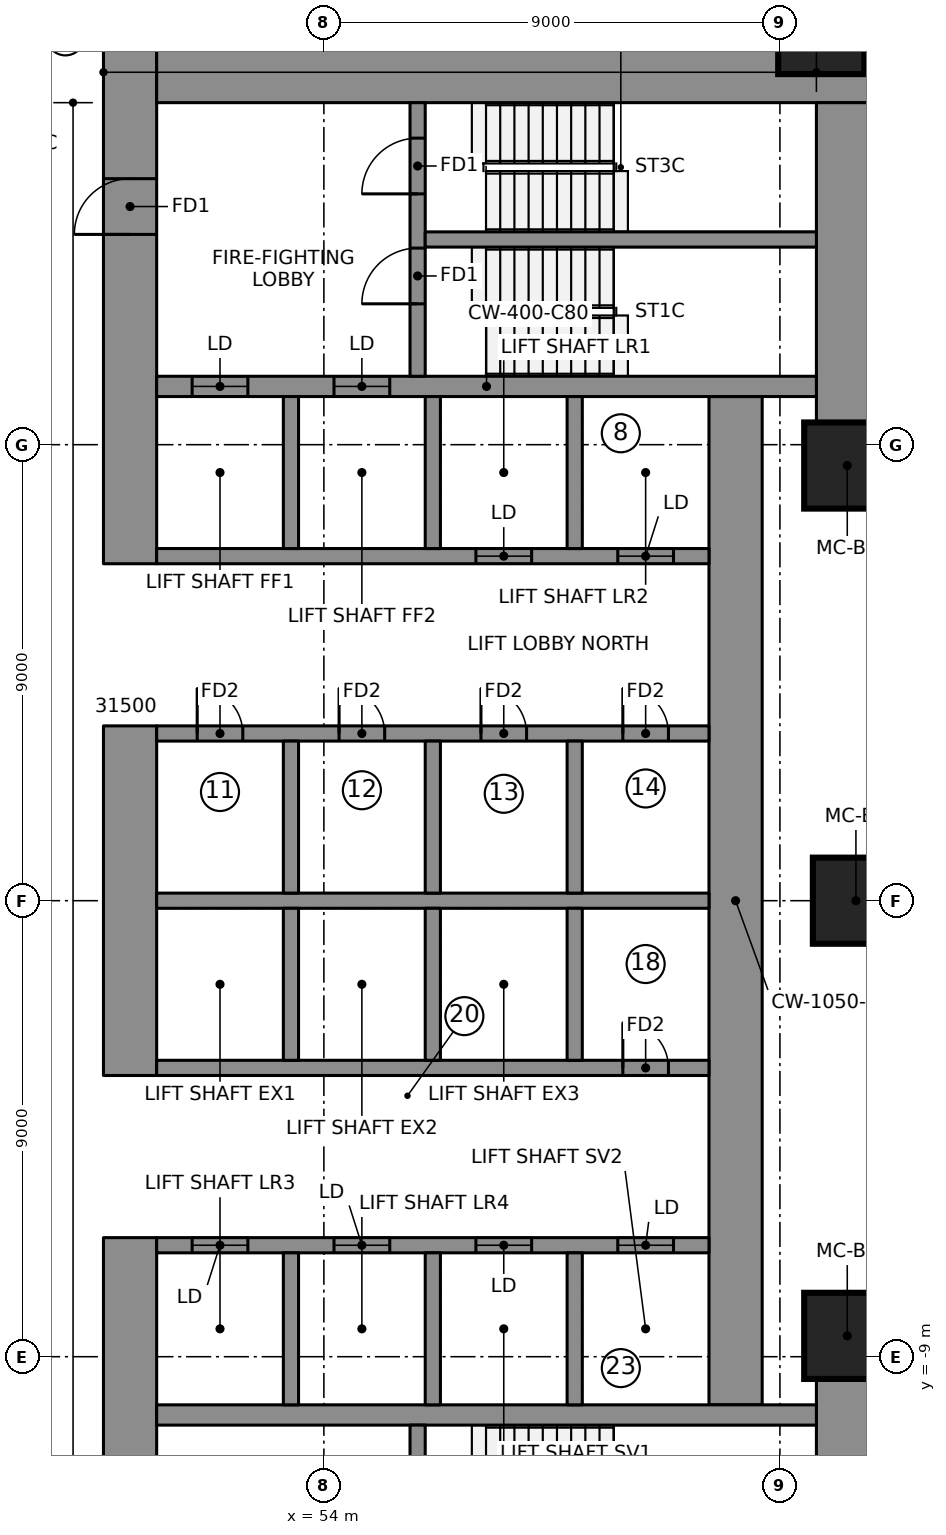
"""IFC4 building model, lengths in metres.
Left out: names, types, materials, properties, quantities, classifications, styles, units other than length and angle.
Written with IfcOpenShell. Run it as: python <this file> out.ifc"""

import sys

from ifc_helpers import new_model, si_unit, direction, frame, frame_2d, origin, origin_2d, place, context, subcontext, project, spatial, rectangle, extrude, element, fill, save


model = new_model("IFC4")
c1 = context("Model", 3, precision=1e-05, world=origin(), true_north=direction((0.0, 1.0)))
c2 = subcontext(c1, "Body", "Model", "MODEL_VIEW")
j1 = project(units=[si_unit("LENGTHUNIT", "METRE"), si_unit("PLANEANGLEUNIT", "RADIAN")], contexts=[c1])
p1 = place(None, origin())
s1 = spatial("IfcSite", under=j1, at=p1, CompositionType="ELEMENT")
p2 = place(p1, origin())
s2 = spatial("IfcBuilding", under=s1, at=p2, CompositionType="ELEMENT")
p3 = place(p2, frame((0.0, 0.0, 92.0)))
s3 = spatial("IfcBuildingStorey", under=s2, at=p3, CompositionType="ELEMENT", Elevation=92.0)
p4 = place(p3, frame((50.175, 6.65, 0.0), z_axis=(0.0, 0.0, 1.0), x_axis=(0.0, 1.0, 0.0)))
e1 = element("IfcWall", 1, at=p4, inside=s3, PredefinedType="SHEAR", context=c2, shape_type="SweptSolid", body=[
    extrude(rectangle(XDim=10.15, YDim=1.05, at=frame_2d((5.075, 0.0))), origin(), (0.0, 0.0, 1.0), 3.55),
])
p5 = place(p4, frame((6.5, 0.0, 0.0)))
e2 = element("IfcOpeningElement", 2, at=p5, cuts=e1, PredefinedType="OPENING", context=c2, shape_type="SweptSolid", body=[
    extrude(rectangle(XDim=1.1, YDim=2.1, at=frame_2d((0.55, 1.05))), frame((0.0, 0.535, 0.0), z_axis=(0.0, -1.0, 0.0), x_axis=(1.0, 0.0, 0.0)), (0.0, 0.0, 1.0), 1.07),
])
p6 = place(p3, frame((50.175, -3.45, 0.0), z_axis=(0.0, 0.0, 1.0), x_axis=(0.0, 1.0, 0.0)))
e3 = element("IfcWall", 3, at=p6, inside=s3, PredefinedType="SHEAR", context=c2, shape_type="SweptSolid", body=[
    extrude(rectangle(XDim=6.9, YDim=1.05, at=frame_2d((3.45, 0.0))), origin(), (0.0, 0.0, 1.0), 3.55),
])
p7 = place(p3, frame((50.175, -16.8, 0.0), z_axis=(0.0, 0.0, 1.0), x_axis=(0.0, 1.0, 0.0)))
e4 = element("IfcWall", 4, at=p7, inside=s3, PredefinedType="SHEAR", context=c2, shape_type="SweptSolid", body=[
    extrude(rectangle(XDim=10.15, YDim=1.05, at=frame_2d((5.075, 0.0))), origin(), (0.0, 0.0, 1.0), 3.55),
])
p8 = place(p7, frame((2.55, 0.0, 0.0)))
e5 = element("IfcOpeningElement", 5, at=p8, cuts=e4, PredefinedType="OPENING", context=c2, shape_type="SweptSolid", body=[
    extrude(rectangle(XDim=1.1, YDim=2.1, at=frame_2d((0.55, 1.05))), frame((0.0, 0.535, 0.0), z_axis=(0.0, -1.0, 0.0), x_axis=(1.0, 0.0, 0.0)), (0.0, 0.0, 1.0), 1.07),
])
p9 = place(p3, frame((50.7, 16.275, 0.0), z_axis=(0.0, 0.0, 1.0), x_axis=(1.0, 0.0, 0.0)))
e6 = element("IfcWall", 6, at=p9, inside=s3, PredefinedType="SHEAR", context=c2, shape_type="SweptSolid", body=[
    extrude(rectangle(XDim=14.07, YDim=1.05, at=frame_2d((7.035, 0.0))), origin(), (0.0, 0.0, 1.0), 3.55),
])
for number, where, z_axis, x_axis in (
    (7, (64.245, 9.389, 0.0), (0.0, 0.0, 1.0), (0.0, 1.0, 0.0)),
    (8, (64.245, -15.75, 0.0), (0.0, 0.0, 1.0), (0.0, 1.0, 0.0)),
):
    element("IfcWall", number, at=place(p3, frame(where, z_axis=z_axis, x_axis=x_axis)), inside=s3, PredefinedType="SHEAR", context=c2, shape_type="SweptSolid", body=[
        extrude(rectangle(XDim=6.361, YDim=1.05, at=frame_2d((3.181, 0.0))), origin(), (0.0, 0.0, 1.0), 3.55),
    ])
p10 = place(p3, frame((62.125, -9.95, 0.0), z_axis=(0.0, 0.0, 1.0), x_axis=(0.0, 1.0, 0.0)))
e9 = element("IfcWall", 9, at=p10, inside=s3, PredefinedType="SHEAR", context=c2, shape_type="SweptSolid", body=[
    extrude(rectangle(XDim=19.9, YDim=1.05, at=frame_2d((9.95, 0.0))), origin(), (0.0, 0.0, 1.0), 3.55),
])
p11 = place(p3, frame((50.7, 10.15, 0.0), z_axis=(0.0, 0.0, 1.0), x_axis=(1.0, 0.0, 0.0)))
e10 = element("IfcWall", 10, at=p11, inside=s3, PredefinedType="SHEAR", context=c2, shape_type="SweptSolid", body=[
    extrude(rectangle(XDim=13.02, YDim=0.4, at=frame_2d((6.51, 0.0))), origin(), (0.0, 0.0, 1.0), 3.55),
])
p12 = place(p11, frame((0.7, 0.0, 0.0)))
e11 = element("IfcOpeningElement", 11, at=p12, cuts=e10, PredefinedType="OPENING", context=c2, shape_type="SweptSolid", body=[
    extrude(rectangle(XDim=1.1, YDim=2.1, at=frame_2d((0.55, 1.05))), frame((0.0, 0.21, 0.0), z_axis=(0.0, -1.0, 0.0), x_axis=(1.0, 0.0, 0.0)), (0.0, 0.0, 1.0), 0.42),
])
p13 = place(p11, frame((3.5, 0.0, 0.0)))
e12 = element("IfcOpeningElement", 12, at=p13, cuts=e10, PredefinedType="OPENING", context=c2, shape_type="SweptSolid", body=[
    extrude(rectangle(XDim=1.1, YDim=2.1, at=frame_2d((0.55, 1.05))), frame((0.0, 0.21, 0.0), z_axis=(0.0, -1.0, 0.0), x_axis=(1.0, 0.0, 0.0)), (0.0, 0.0, 1.0), 0.42),
])
p14 = place(p3, frame((50.7, -10.15, 0.0), z_axis=(0.0, 0.0, 1.0), x_axis=(1.0, 0.0, 0.0)))
e13 = element("IfcWall", 13, at=p14, inside=s3, PredefinedType="SHEAR", context=c2, shape_type="SweptSolid", body=[
    extrude(rectangle(XDim=13.02, YDim=0.4, at=frame_2d((6.51, 0.0))), origin(), (0.0, 0.0, 1.0), 3.55),
])
p15 = place(p3, frame((50.7, 0.0, 0.0), z_axis=(0.0, 0.0, 1.0), x_axis=(1.0, 0.0, 0.0)))
e14 = element("IfcWall", 14, at=p15, inside=s3, PredefinedType="SHEAR", context=c2, shape_type="SweptSolid", body=[
    extrude(rectangle(XDim=10.9, YDim=0.3, at=frame_2d((5.45, 0.0))), origin(), (0.0, 0.0, 1.0), 3.55),
])
p16 = place(p3, frame((50.7, 3.3, 0.0), z_axis=(0.0, 0.0, 1.0), x_axis=(1.0, 0.0, 0.0)))
e15 = element("IfcWall", 15, at=p16, inside=s3, PredefinedType="SHEAR", context=c2, shape_type="SweptSolid", body=[
    extrude(rectangle(XDim=10.9, YDim=0.3, at=frame_2d((5.45, 0.0))), origin(), (0.0, 0.0, 1.0), 3.55),
])
p17 = place(p16, frame((0.8, 0.0, 0.0)))
e16 = element("IfcOpeningElement", 16, at=p17, cuts=e15, PredefinedType="OPENING", context=c2, shape_type="SweptSolid", body=[
    extrude(rectangle(XDim=0.9, YDim=2.1, at=frame_2d((0.45, 1.05))), frame((0.0, 0.16, 0.0), z_axis=(0.0, -1.0, 0.0), x_axis=(1.0, 0.0, 0.0)), (0.0, 0.0, 1.0), 0.32),
])
p18 = place(p16, frame((3.6, 0.0, 0.0)))
e17 = element("IfcOpeningElement", 17, at=p18, cuts=e15, PredefinedType="OPENING", context=c2, shape_type="SweptSolid", body=[
    extrude(rectangle(XDim=0.9, YDim=2.1, at=frame_2d((0.45, 1.05))), frame((0.0, 0.16, 0.0), z_axis=(0.0, -1.0, 0.0), x_axis=(1.0, 0.0, 0.0)), (0.0, 0.0, 1.0), 0.32),
])
p19 = place(p16, frame((6.4, 0.0, 0.0)))
e18 = element("IfcOpeningElement", 18, at=p19, cuts=e15, PredefinedType="OPENING", context=c2, shape_type="SweptSolid", body=[
    extrude(rectangle(XDim=0.9, YDim=2.1, at=frame_2d((0.45, 1.05))), frame((0.0, 0.16, 0.0), z_axis=(0.0, -1.0, 0.0), x_axis=(1.0, 0.0, 0.0)), (0.0, 0.0, 1.0), 0.32),
])
p20 = place(p16, frame((9.2, 0.0, 0.0)))
e19 = element("IfcOpeningElement", 19, at=p20, cuts=e15, PredefinedType="OPENING", context=c2, shape_type="SweptSolid", body=[
    extrude(rectangle(XDim=0.9, YDim=2.1, at=frame_2d((0.45, 1.05))), frame((0.0, 0.16, 0.0), z_axis=(0.0, -1.0, 0.0), x_axis=(1.0, 0.0, 0.0)), (0.0, 0.0, 1.0), 0.32),
])
p21 = place(p3, frame((50.7, 6.8, 0.0), z_axis=(0.0, 0.0, 1.0), x_axis=(1.0, 0.0, 0.0)))
e20 = element("IfcWall", 20, at=p21, inside=s3, PredefinedType="SHEAR", context=c2, shape_type="SweptSolid", body=[
    extrude(rectangle(XDim=10.9, YDim=0.3, at=frame_2d((5.45, 0.0))), origin(), (0.0, 0.0, 1.0), 3.55),
])
p22 = place(p21, frame((6.3, 0.0, 0.0)))
e21 = element("IfcOpeningElement", 21, at=p22, cuts=e20, PredefinedType="OPENING", context=c2, shape_type="SweptSolid", body=[
    extrude(rectangle(XDim=1.1, YDim=2.1, at=frame_2d((0.55, 1.05))), frame((0.0, 0.16, 0.0), z_axis=(0.0, -1.0, 0.0), x_axis=(1.0, 0.0, 0.0)), (0.0, 0.0, 1.0), 0.32),
])
p23 = place(p21, frame((9.1, 0.0, 0.0)))
e22 = element("IfcOpeningElement", 22, at=p23, cuts=e20, PredefinedType="OPENING", context=c2, shape_type="SweptSolid", body=[
    extrude(rectangle(XDim=1.1, YDim=2.1, at=frame_2d((0.55, 1.05))), frame((0.0, 0.16, 0.0), z_axis=(0.0, -1.0, 0.0), x_axis=(1.0, 0.0, 0.0)), (0.0, 0.0, 1.0), 0.32),
])
for number, where, z_axis, x_axis in (
    (23, (53.35, 0.15, 0.0), (0.0, 0.0, 1.0), (0.0, 1.0, 0.0)),
    (24, (53.35, 6.95, 0.0), (0.0, 0.0, 1.0), (0.0, 1.0, 0.0)),
    (25, (56.15, 0.15, 0.0), (0.0, 0.0, 1.0), (0.0, 1.0, 0.0)),
    (26, (56.15, 6.95, 0.0), (0.0, 0.0, 1.0), (0.0, 1.0, 0.0)),
    (27, (58.95, 0.15, 0.0), (0.0, 0.0, 1.0), (0.0, 1.0, 0.0)),
    (28, (58.95, 6.95, 0.0), (0.0, 0.0, 1.0), (0.0, 1.0, 0.0)),
):
    element("IfcWall", number, at=place(p3, frame(where, z_axis=z_axis, x_axis=x_axis)), inside=s3, PredefinedType="SHEAR", context=c2, shape_type="SweptSolid", body=[
        extrude(rectangle(XDim=3.0, YDim=0.3, at=frame_2d((1.5, 0.0))), origin(), (0.0, 0.0, 1.0), 3.55),
    ])
p24 = place(p3, frame((50.7, -3.3, 0.0), z_axis=(0.0, 0.0, 1.0), x_axis=(1.0, 0.0, 0.0)))
e29 = element("IfcWall", 29, at=p24, inside=s3, PredefinedType="SHEAR", context=c2, shape_type="SweptSolid", body=[
    extrude(rectangle(XDim=10.9, YDim=0.3, at=frame_2d((5.45, 0.0))), origin(), (0.0, 0.0, 1.0), 3.55),
])
p25 = place(p24, frame((9.2, 0.0, 0.0)))
e30 = element("IfcOpeningElement", 30, at=p25, cuts=e29, PredefinedType="OPENING", context=c2, shape_type="SweptSolid", body=[
    extrude(rectangle(XDim=0.9, YDim=2.1, at=frame_2d((0.45, 1.05))), frame((0.0, 0.16, 0.0), z_axis=(0.0, -1.0, 0.0), x_axis=(1.0, 0.0, 0.0)), (0.0, 0.0, 1.0), 0.32),
])
p26 = place(p3, frame((50.7, -6.8, 0.0), z_axis=(0.0, 0.0, 1.0), x_axis=(1.0, 0.0, 0.0)))
e31 = element("IfcWall", 31, at=p26, inside=s3, PredefinedType="SHEAR", context=c2, shape_type="SweptSolid", body=[
    extrude(rectangle(XDim=10.9, YDim=0.3, at=frame_2d((5.45, 0.0))), origin(), (0.0, 0.0, 1.0), 3.55),
])
p27 = place(p26, frame((0.7, 0.0, 0.0)))
e32 = element("IfcOpeningElement", 32, at=p27, cuts=e31, PredefinedType="OPENING", context=c2, shape_type="SweptSolid", body=[
    extrude(rectangle(XDim=1.1, YDim=2.1, at=frame_2d((0.55, 1.05))), frame((0.0, 0.16, 0.0), z_axis=(0.0, -1.0, 0.0), x_axis=(1.0, 0.0, 0.0)), (0.0, 0.0, 1.0), 0.32),
])
p28 = place(p26, frame((3.5, 0.0, 0.0)))
e33 = element("IfcOpeningElement", 33, at=p28, cuts=e31, PredefinedType="OPENING", context=c2, shape_type="SweptSolid", body=[
    extrude(rectangle(XDim=1.1, YDim=2.1, at=frame_2d((0.55, 1.05))), frame((0.0, 0.16, 0.0), z_axis=(0.0, -1.0, 0.0), x_axis=(1.0, 0.0, 0.0)), (0.0, 0.0, 1.0), 0.32),
])
p29 = place(p26, frame((6.3, 0.0, 0.0)))
e34 = element("IfcOpeningElement", 34, at=p29, cuts=e31, PredefinedType="OPENING", context=c2, shape_type="SweptSolid", body=[
    extrude(rectangle(XDim=1.1, YDim=2.1, at=frame_2d((0.55, 1.05))), frame((0.0, 0.16, 0.0), z_axis=(0.0, -1.0, 0.0), x_axis=(1.0, 0.0, 0.0)), (0.0, 0.0, 1.0), 0.32),
])
p30 = place(p26, frame((9.1, 0.0, 0.0)))
e35 = element("IfcOpeningElement", 35, at=p30, cuts=e31, PredefinedType="OPENING", context=c2, shape_type="SweptSolid", body=[
    extrude(rectangle(XDim=1.1, YDim=2.1, at=frame_2d((0.55, 1.05))), frame((0.0, 0.16, 0.0), z_axis=(0.0, -1.0, 0.0), x_axis=(1.0, 0.0, 0.0)), (0.0, 0.0, 1.0), 0.32),
])
for number, where, z_axis, x_axis in (
    (36, (53.35, -3.15, 0.0), (0.0, 0.0, 1.0), (0.0, 1.0, 0.0)),
    (37, (53.35, -9.95, 0.0), (0.0, 0.0, 1.0), (0.0, 1.0, 0.0)),
    (38, (56.15, -3.15, 0.0), (0.0, 0.0, 1.0), (0.0, 1.0, 0.0)),
    (39, (56.15, -9.95, 0.0), (0.0, 0.0, 1.0), (0.0, 1.0, 0.0)),
    (40, (58.95, -3.15, 0.0), (0.0, 0.0, 1.0), (0.0, 1.0, 0.0)),
    (41, (58.95, -9.95, 0.0), (0.0, 0.0, 1.0), (0.0, 1.0, 0.0)),
):
    element("IfcWall", number, at=place(p3, frame(where, z_axis=z_axis, x_axis=x_axis)), inside=s3, PredefinedType="SHEAR", context=c2, shape_type="SweptSolid", body=[
        extrude(rectangle(XDim=3.0, YDim=0.3, at=frame_2d((1.5, 0.0))), origin(), (0.0, 0.0, 1.0), 3.55),
    ])
p31 = place(p3, frame((55.85, 10.35, 0.0), z_axis=(0.0, 0.0, 1.0), x_axis=(0.0, 1.0, 0.0)))
e42 = element("IfcWall", 42, at=p31, inside=s3, PredefinedType="SHEAR", context=c2, shape_type="SweptSolid", body=[
    extrude(rectangle(XDim=5.4, YDim=0.3, at=frame_2d((2.7, 0.0))), origin(), (0.0, 0.0, 1.0), 3.55),
])
p32 = place(p31, frame((1.43, 0.0, 0.0)))
e43 = element("IfcOpeningElement", 43, at=p32, cuts=e42, PredefinedType="OPENING", context=c2, shape_type="SweptSolid", body=[
    extrude(rectangle(XDim=1.1, YDim=2.1, at=frame_2d((0.55, 1.05))), frame((0.0, 0.16, 0.0), z_axis=(0.0, -1.0, 0.0), x_axis=(1.0, 0.0, 0.0)), (0.0, 0.0, 1.0), 0.32),
])
p33 = place(p31, frame((3.6, 0.0, 0.0)))
e44 = element("IfcOpeningElement", 44, at=p33, cuts=e42, PredefinedType="OPENING", context=c2, shape_type="SweptSolid", body=[
    extrude(rectangle(XDim=1.1, YDim=2.1, at=frame_2d((0.55, 1.05))), frame((0.0, 0.16, 0.0), z_axis=(0.0, -1.0, 0.0), x_axis=(1.0, 0.0, 0.0)), (0.0, 0.0, 1.0), 0.32),
])
p34 = place(p3, frame((55.85, -15.75, 0.0), z_axis=(0.0, 0.0, 1.0), x_axis=(0.0, 1.0, 0.0)))
e45 = element("IfcWall", 45, at=p34, inside=s3, PredefinedType="SHEAR", context=c2, shape_type="SweptSolid", body=[
    extrude(rectangle(XDim=5.4, YDim=0.3, at=frame_2d((2.7, 0.0))), origin(), (0.0, 0.0, 1.0), 3.55),
])
p35 = place(p34, frame((3.6, 0.0, 0.0)))
e46 = element("IfcOpeningElement", 46, at=p35, cuts=e45, PredefinedType="OPENING", context=c2, shape_type="SweptSolid", body=[
    extrude(rectangle(XDim=1.1, YDim=2.1, at=frame_2d((0.55, 1.05))), frame((0.0, 0.16, 0.0), z_axis=(0.0, -1.0, 0.0), x_axis=(1.0, 0.0, 0.0)), (0.0, 0.0, 1.0), 0.32),
])
p36 = place(p34, frame((0.8, 0.0, 0.0)))
e47 = element("IfcOpeningElement", 47, at=p36, cuts=e45, PredefinedType="OPENING", context=c2, shape_type="SweptSolid", body=[
    extrude(rectangle(XDim=0.9, YDim=2.1, at=frame_2d((0.45, 1.05))), frame((0.0, 0.16, 0.0), z_axis=(0.0, -1.0, 0.0), x_axis=(1.0, 0.0, 0.0)), (0.0, 0.0, 1.0), 0.32),
])
p37 = place(p3, frame((56.0, 13.05, 0.0), z_axis=(0.0, 0.0, 1.0), x_axis=(1.0, 0.0, 0.0)))
e48 = element("IfcWall", 48, at=p37, inside=s3, PredefinedType="SHEAR", context=c2, shape_type="SweptSolid", body=[
    extrude(rectangle(XDim=7.72, YDim=0.3, at=frame_2d((3.86, 0.0))), origin(), (0.0, 0.0, 1.0), 3.55),
])
for number, where, z_axis, x_axis in (
    (49, (64.329, -8.589, 0.0), (0.0, 0.0, 1.0), (1.0, 0.0, 0.0)),
    (50, (64.5, 0.0, 0.0), (0.0, 0.0, 1.0), (1.0, 0.0, 0.0)),
    (51, (64.329, 8.589, 0.0), (0.0, 0.0, 1.0), (1.0, 0.0, 0.0)),
    (52, (63.816, 17.164, 0.0), (0.0, 0.0, 1.0), (1.0, 0.0, 0.0)),
):
    element("IfcColumn", number, at=place(p3, frame(where, z_axis=z_axis, x_axis=x_axis)), inside=s3, PredefinedType="COLUMN", context=c2, shape_type="SweptSolid", body=[
        extrude(rectangle(XDim=1.7, YDim=1.7, at=origin_2d()), origin(), (0.0, 0.0, 1.0), 3.55),
    ])
p38 = place(p12, origin())
e53 = element("IfcDoor", 53, at=p38, inside=s3, OperationType="DOUBLE_DOOR_SLIDING", PredefinedType="DOOR", context=c2, shape_type="SweptSolid", body=[
    extrude(rectangle(XDim=1.1, YDim=2.1, at=frame_2d((0.55, 1.05))), frame((0.0, 0.025, 0.0), z_axis=(0.0, -1.0, 0.0), x_axis=(1.0, 0.0, 0.0)), (0.0, 0.0, 1.0), 0.05),
])
fill(e11, e53)
p39 = place(p13, origin())
e54 = element("IfcDoor", 54, at=p39, inside=s3, OperationType="DOUBLE_DOOR_SLIDING", PredefinedType="DOOR", context=c2, shape_type="SweptSolid", body=[
    extrude(rectangle(XDim=1.1, YDim=2.1, at=frame_2d((0.55, 1.05))), frame((0.0, 0.025, 0.0), z_axis=(0.0, -1.0, 0.0), x_axis=(1.0, 0.0, 0.0)), (0.0, 0.0, 1.0), 0.05),
])
fill(e12, e54)
p40 = place(p22, origin())
e55 = element("IfcDoor", 55, at=p40, inside=s3, OperationType="DOUBLE_DOOR_SLIDING", PredefinedType="DOOR", context=c2, shape_type="SweptSolid", body=[
    extrude(rectangle(XDim=1.1, YDim=2.1, at=frame_2d((0.55, 1.05))), frame((0.0, 0.025, 0.0), z_axis=(0.0, -1.0, 0.0), x_axis=(1.0, 0.0, 0.0)), (0.0, 0.0, 1.0), 0.05),
])
fill(e21, e55)
p41 = place(p23, origin())
e56 = element("IfcDoor", 56, at=p41, inside=s3, OperationType="DOUBLE_DOOR_SLIDING", PredefinedType="DOOR", context=c2, shape_type="SweptSolid", body=[
    extrude(rectangle(XDim=1.1, YDim=2.1, at=frame_2d((0.55, 1.05))), frame((0.0, 0.025, 0.0), z_axis=(0.0, -1.0, 0.0), x_axis=(1.0, 0.0, 0.0)), (0.0, 0.0, 1.0), 0.05),
])
fill(e22, e56)
p42 = place(p27, origin())
e57 = element("IfcDoor", 57, at=p42, inside=s3, OperationType="DOUBLE_DOOR_SLIDING", PredefinedType="DOOR", context=c2, shape_type="SweptSolid", body=[
    extrude(rectangle(XDim=1.1, YDim=2.1, at=frame_2d((0.55, 1.05))), frame((0.0, 0.025, 0.0), z_axis=(0.0, -1.0, 0.0), x_axis=(1.0, 0.0, 0.0)), (0.0, 0.0, 1.0), 0.05),
])
fill(e32, e57)
p43 = place(p28, origin())
e58 = element("IfcDoor", 58, at=p43, inside=s3, OperationType="DOUBLE_DOOR_SLIDING", PredefinedType="DOOR", context=c2, shape_type="SweptSolid", body=[
    extrude(rectangle(XDim=1.1, YDim=2.1, at=frame_2d((0.55, 1.05))), frame((0.0, 0.025, 0.0), z_axis=(0.0, -1.0, 0.0), x_axis=(1.0, 0.0, 0.0)), (0.0, 0.0, 1.0), 0.05),
])
fill(e33, e58)
p44 = place(p29, origin())
e59 = element("IfcDoor", 59, at=p44, inside=s3, OperationType="DOUBLE_DOOR_SLIDING", PredefinedType="DOOR", context=c2, shape_type="SweptSolid", body=[
    extrude(rectangle(XDim=1.1, YDim=2.1, at=frame_2d((0.55, 1.05))), frame((0.0, 0.025, 0.0), z_axis=(0.0, -1.0, 0.0), x_axis=(1.0, 0.0, 0.0)), (0.0, 0.0, 1.0), 0.05),
])
fill(e34, e59)
p45 = place(p30, origin())
e60 = element("IfcDoor", 60, at=p45, inside=s3, OperationType="DOUBLE_DOOR_SLIDING", PredefinedType="DOOR", context=c2, shape_type="SweptSolid", body=[
    extrude(rectangle(XDim=1.1, YDim=2.1, at=frame_2d((0.55, 1.05))), frame((0.0, 0.025, 0.0), z_axis=(0.0, -1.0, 0.0), x_axis=(1.0, 0.0, 0.0)), (0.0, 0.0, 1.0), 0.05),
])
fill(e35, e60)
p46 = place(p32, origin())
e61 = element("IfcDoor", 61, at=p46, inside=s3, OperationType="SINGLE_SWING_RIGHT", PredefinedType="DOOR", context=c2, shape_type="SweptSolid", body=[
    extrude(rectangle(XDim=1.1, YDim=2.1, at=frame_2d((0.55, 1.05))), frame((0.0, 0.025, 0.0), z_axis=(0.0, -1.0, 0.0), x_axis=(1.0, 0.0, 0.0)), (0.0, 0.0, 1.0), 0.05),
])
fill(e43, e61)
p47 = place(p33, origin())
e62 = element("IfcDoor", 62, at=p47, inside=s3, OperationType="SINGLE_SWING_RIGHT", PredefinedType="DOOR", context=c2, shape_type="SweptSolid", body=[
    extrude(rectangle(XDim=1.1, YDim=2.1, at=frame_2d((0.55, 1.05))), frame((0.0, 0.025, 0.0), z_axis=(0.0, -1.0, 0.0), x_axis=(1.0, 0.0, 0.0)), (0.0, 0.0, 1.0), 0.05),
])
fill(e44, e62)
p48 = place(p5, origin())
e63 = element("IfcDoor", 63, at=p48, inside=s3, OperationType="SINGLE_SWING_RIGHT", PredefinedType="DOOR", context=c2, shape_type="SweptSolid", body=[
    extrude(rectangle(XDim=1.1, YDim=2.1, at=frame_2d((0.55, 1.05))), frame((0.0, 0.025, 0.0), z_axis=(0.0, -1.0, 0.0), x_axis=(1.0, 0.0, 0.0)), (0.0, 0.0, 1.0), 0.05),
])
fill(e2, e63)
p49 = place(p17, origin())
e64 = element("IfcDoor", 64, at=p49, inside=s3, OperationType="SINGLE_SWING_LEFT", PredefinedType="DOOR", context=c2, shape_type="SweptSolid", body=[
    extrude(rectangle(XDim=0.9, YDim=2.1, at=frame_2d((0.45, 1.05))), frame((0.0, 0.025, 0.0), z_axis=(0.0, -1.0, 0.0), x_axis=(1.0, 0.0, 0.0)), (0.0, 0.0, 1.0), 0.05),
])
fill(e16, e64)
p50 = place(p18, origin())
e65 = element("IfcDoor", 65, at=p50, inside=s3, OperationType="SINGLE_SWING_LEFT", PredefinedType="DOOR", context=c2, shape_type="SweptSolid", body=[
    extrude(rectangle(XDim=0.9, YDim=2.1, at=frame_2d((0.45, 1.05))), frame((0.0, 0.025, 0.0), z_axis=(0.0, -1.0, 0.0), x_axis=(1.0, 0.0, 0.0)), (0.0, 0.0, 1.0), 0.05),
])
fill(e17, e65)
p51 = place(p19, origin())
e66 = element("IfcDoor", 66, at=p51, inside=s3, OperationType="SINGLE_SWING_LEFT", PredefinedType="DOOR", context=c2, shape_type="SweptSolid", body=[
    extrude(rectangle(XDim=0.9, YDim=2.1, at=frame_2d((0.45, 1.05))), frame((0.0, 0.025, 0.0), z_axis=(0.0, -1.0, 0.0), x_axis=(1.0, 0.0, 0.0)), (0.0, 0.0, 1.0), 0.05),
])
fill(e18, e66)
p52 = place(p20, origin())
e67 = element("IfcDoor", 67, at=p52, inside=s3, OperationType="SINGLE_SWING_LEFT", PredefinedType="DOOR", context=c2, shape_type="SweptSolid", body=[
    extrude(rectangle(XDim=0.9, YDim=2.1, at=frame_2d((0.45, 1.05))), frame((0.0, 0.025, 0.0), z_axis=(0.0, -1.0, 0.0), x_axis=(1.0, 0.0, 0.0)), (0.0, 0.0, 1.0), 0.05),
])
fill(e19, e67)
p53 = place(p25, origin())
e68 = element("IfcDoor", 68, at=p53, inside=s3, OperationType="SINGLE_SWING_LEFT", PredefinedType="DOOR", context=c2, shape_type="SweptSolid", body=[
    extrude(rectangle(XDim=0.9, YDim=2.1, at=frame_2d((0.45, 1.05))), frame((0.0, 0.025, 0.0), z_axis=(0.0, -1.0, 0.0), x_axis=(1.0, 0.0, 0.0)), (0.0, 0.0, 1.0), 0.05),
])
fill(e30, e68)
save(model, sys.argv[1])
